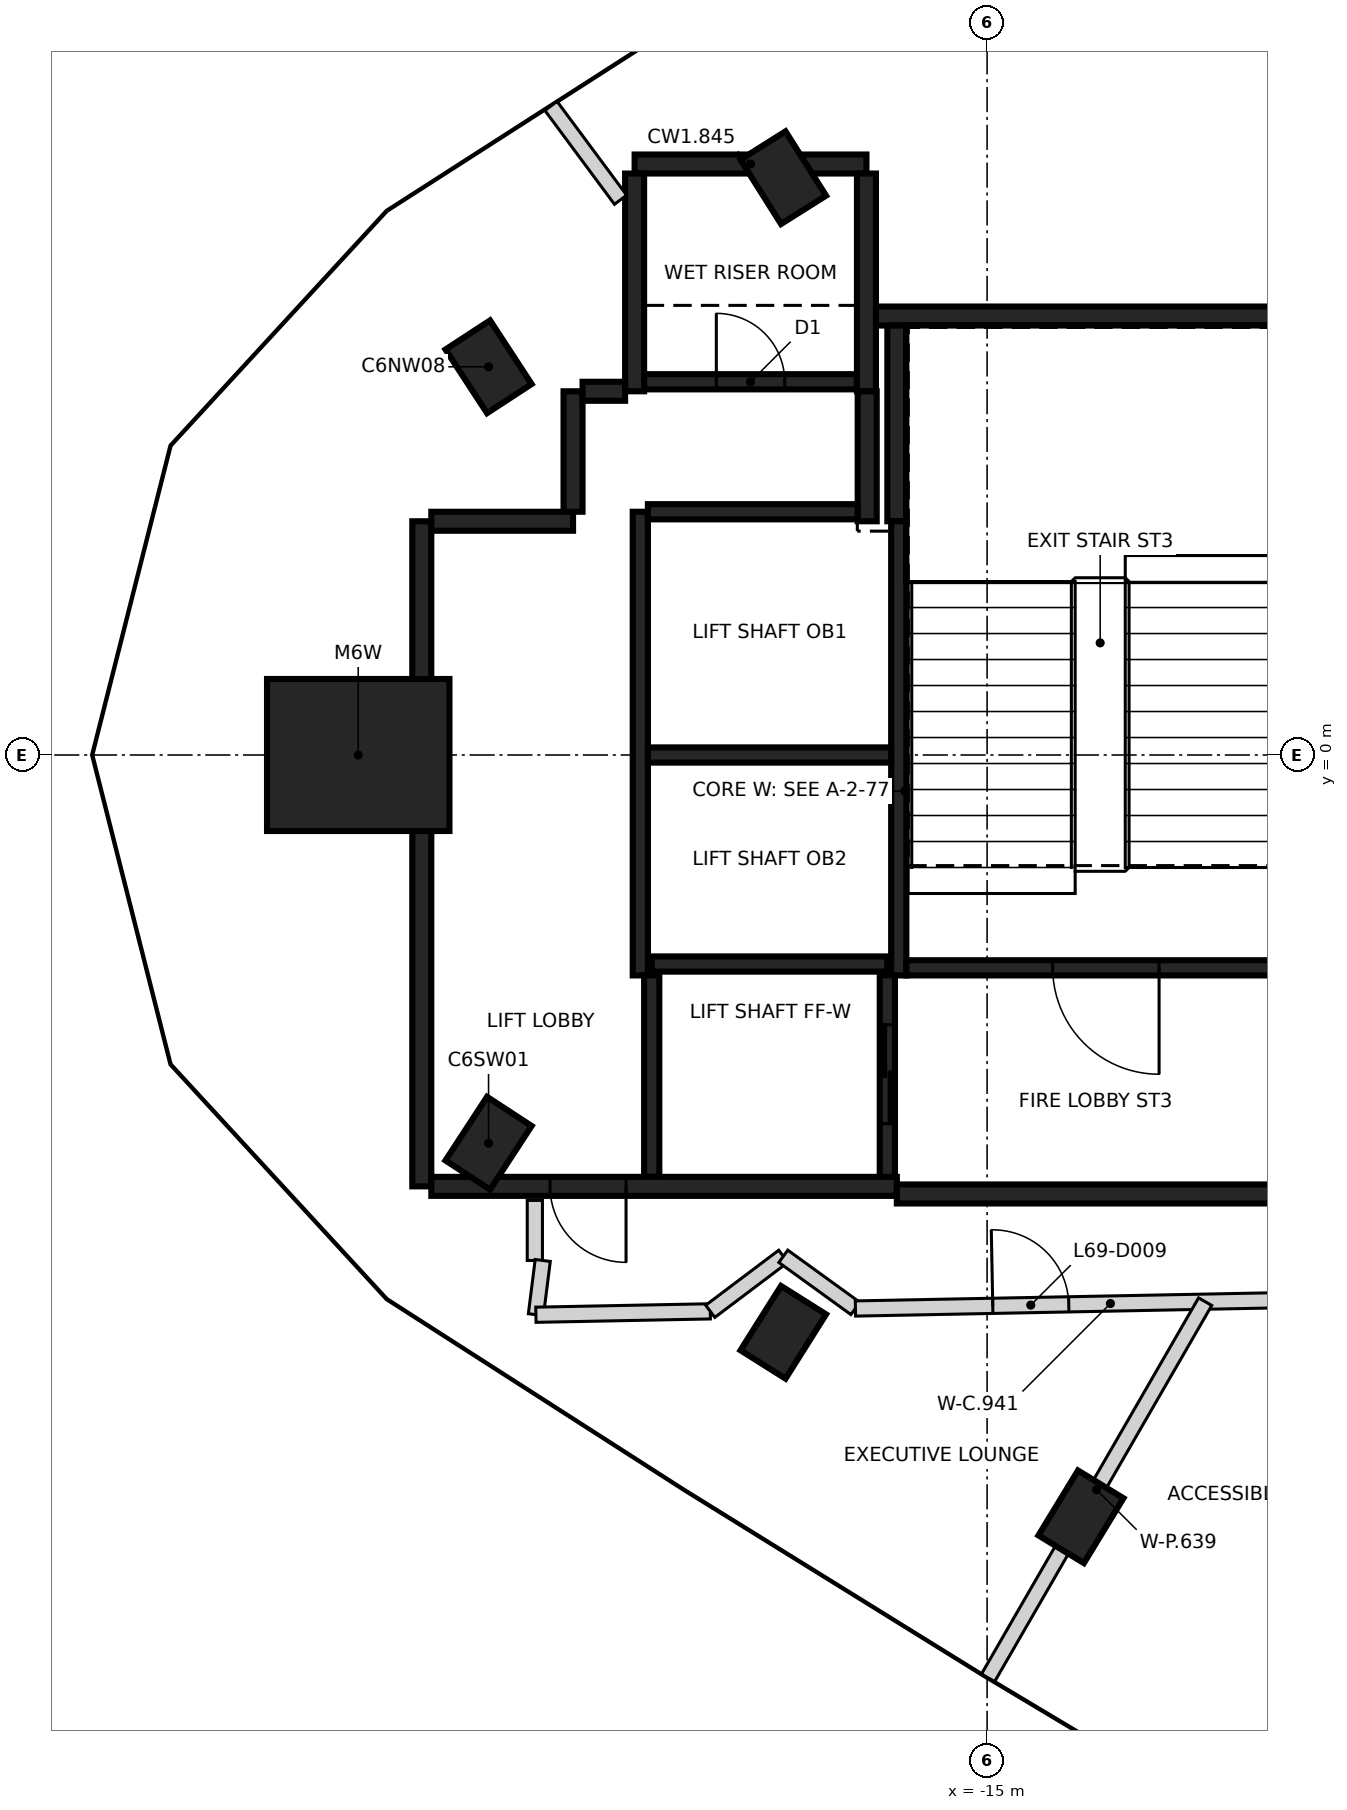
"""IFC4 building model, lengths in metres.
Left out: names, types, materials, properties, quantities, classifications, styles, units other than length and angle.
Written with IfcOpenShell. Run it as: python <this file> out.ifc"""

import sys

from ifc_helpers import new_model, si_unit, direction, frame, frame_2d, origin, origin_2d, place, context, subcontext, project, spatial, rectangle, extrude, element, fill, save


model = new_model("IFC4")
c1 = context("Model", 3, precision=1e-05, world=origin(), true_north=direction((0.0, 1.0)))
c2 = subcontext(c1, "Body", "Model", "MODEL_VIEW")
j1 = project(units=[si_unit("LENGTHUNIT", "METRE"), si_unit("PLANEANGLEUNIT", "RADIAN")], contexts=[c1])
p1 = place(None, origin())
s1 = spatial("IfcSite", under=j1, at=p1, CompositionType="ELEMENT")
p2 = place(p1, origin())
s2 = spatial("IfcBuilding", under=s1, at=p2, CompositionType="ELEMENT")
p3 = place(p2, frame((0.0, 0.0, 273.0)))
s3 = spatial("IfcBuildingStorey", under=s2, at=p3, CompositionType="ELEMENT", Elevation=273.0)
for number, where, z_axis, x_axis in (
    (1, (-17.681, 7.595, -0.35), (0.0, 0.0, 1.0), (-0.533, 0.846, 0.0)),
    (2, (-21.559, 5.107, -0.35), (0.0, 0.0, 1.0), (-0.547, 0.837, 0.0)),
    (3, (-21.559, -5.107, -0.35), (0.0, 0.0, 1.0), (0.547, 0.837, 0.0)),
    (4, (-17.681, -7.595, -0.35), (0.0, 0.0, 1.0), (0.533, 0.846, 0.0)),
    (5, (-13.765, -10.022, -0.35), (0.0, 0.0, 1.0), (0.52, 0.854, 0.0)),
):
    element("IfcColumn", number, at=place(p3, frame(where, z_axis=z_axis, x_axis=x_axis)), inside=s3, PredefinedType="COLUMN", context=c2, shape_type="SweptSolid", body=[
        extrude(rectangle(XDim=1.0, YDim=0.7, at=origin_2d()), origin(), (0.0, 0.0, 1.0), 3.6),
    ])
p4 = place(p3, frame((-23.273, 0.0, -0.35), z_axis=(0.0, 0.0, 1.0), x_axis=(1.0, 0.0, 0.0)))
e6 = element("IfcColumn", 6, at=p4, inside=s3, PredefinedType="COLUMN", context=c2, shape_type="SweptSolid", body=[
    extrude(rectangle(XDim=2.4, YDim=2.0, at=origin_2d()), origin(), (0.0, 0.0, 1.0), 3.6),
])
p5 = place(p3, frame((-22.437, -5.675, 0.0), z_axis=(0.0, 0.0, 1.0), x_axis=(0.0, 1.0, 0.0)))
e7 = element("IfcWall", 7, at=p5, inside=s3, PredefinedType="SHEAR", context=c2, shape_type="SweptSolid", body=[
    extrude(rectangle(XDim=8.75, YDim=0.25, at=frame_2d((4.375, 0.0))), origin(), (0.0, 0.0, 1.0), 3.25),
])
p6 = place(p3, frame((-16.187, -5.675, 0.0), z_axis=(0.0, 0.0, 1.0), x_axis=(-1.0, 0.0, 0.0)))
e8 = element("IfcWall", 8, at=p6, inside=s3, PredefinedType="SHEAR", context=c2, shape_type="SweptSolid", body=[
    extrude(rectangle(XDim=6.125, YDim=0.25, at=frame_2d((3.062, 0.0))), origin(), (0.0, 0.0, 1.0), 3.25),
])
p7 = place(p6, frame((3.563, 0.0, 0.0)))
e9 = element("IfcOpeningElement", 9, at=p7, cuts=e8, PredefinedType="OPENING", context=c2, shape_type="SweptSolid", body=[
    extrude(rectangle(XDim=1.0, YDim=2.1, at=frame_2d((0.5, 1.05))), frame((0.0, 0.135, 0.0), z_axis=(0.0, -1.0, 0.0), x_axis=(1.0, 0.0, 0.0)), (0.0, 0.0, 1.0), 0.27),
])
p8 = place(p3, frame((-10.963, -5.775, 0.0), z_axis=(0.0, 0.0, 1.0), x_axis=(-1.0, 0.0, 0.0)))
e10 = element("IfcWall", 10, at=p8, inside=s3, PredefinedType="SHEAR", context=c2, shape_type="SweptSolid", body=[
    extrude(rectangle(XDim=5.225, YDim=0.25, at=frame_2d((2.612, 0.0))), origin(), (0.0, 0.0, 1.0), 3.25),
])
p9 = place(p3, frame((-16.472, 5.775, 0.0), z_axis=(0.0, 0.0, 1.0), x_axis=(1.0, 0.0, 0.0)))
e11 = element("IfcWall", 11, at=p9, inside=s3, PredefinedType="SHEAR", context=c2, shape_type="SweptSolid", body=[
    extrude(rectangle(XDim=5.51, YDim=0.25, at=frame_2d((2.755, 0.0))), origin(), (0.0, 0.0, 1.0), 3.25),
])
p10 = place(p3, frame((-19.637, 7.775, 0.0), z_axis=(0.0, 0.0, 1.0), x_axis=(1.0, 0.0, 0.0)))
e12 = element("IfcWall", 12, at=p10, inside=s3, PredefinedType="SHEAR", context=c2, shape_type="SweptSolid", body=[
    extrude(rectangle(XDim=3.05, YDim=0.25, at=frame_2d((1.525, 0.0))), origin(), (0.0, 0.0, 1.0), 3.25),
])
for number, where, z_axis, x_axis in (
    (13, (-16.587, 7.65, 0.0), (0.0, 0.0, 1.0), (0.0, -1.0, 0.0)),
    (14, (-19.637, 4.785, 0.0), (0.0, 0.0, 1.0), (0.0, 1.0, 0.0)),
):
    element("IfcWall", number, at=place(p3, frame(where, z_axis=z_axis, x_axis=x_axis)), inside=s3, PredefinedType="SHEAR", context=c2, shape_type="SweptSolid", body=[
        extrude(rectangle(XDim=2.865, YDim=0.25, at=frame_2d((1.432, 0.0))), origin(), (0.0, 0.0, 1.0), 3.25),
    ])
p11 = place(p3, frame((-16.187, 3.075, 0.0), z_axis=(0.0, 0.0, 1.0), x_axis=(0.0, 1.0, 0.0)))
e15 = element("IfcWall", 15, at=p11, inside=s3, PredefinedType="SHEAR", context=c2, shape_type="SweptSolid", body=[
    extrude(rectangle(XDim=2.575, YDim=0.25, at=frame_2d((1.287, 0.0))), origin(), (0.0, 0.0, 1.0), 3.25),
])
p12 = place(p3, frame((-22.312, 3.075, 0.0), z_axis=(0.0, 0.0, 1.0), x_axis=(1.0, 0.0, 0.0)))
e16 = element("IfcWall", 16, at=p12, inside=s3, PredefinedType="SHEAR", context=c2, shape_type="SweptSolid", body=[
    extrude(rectangle(XDim=1.865, YDim=0.25, at=frame_2d((0.932, 0.0))), origin(), (0.0, 0.0, 1.0), 3.25),
])
p13 = place(p3, frame((-16.577, 4.785, 0.0), z_axis=(0.0, 0.0, 1.0), x_axis=(0.0, -1.0, 0.0)))
e17 = element("IfcWall", 17, at=p13, inside=s3, PredefinedType="SHEAR", context=c2, shape_type="SweptSolid", body=[
    extrude(rectangle(XDim=1.71, YDim=0.25, at=frame_2d((0.855, 0.0))), origin(), (0.0, 0.0, 1.0), 3.25),
])
p14 = place(p3, frame((-20.447, 3.2, 0.0), z_axis=(0.0, 0.0, 1.0), x_axis=(0.0, 1.0, 0.0)))
e18 = element("IfcWall", 18, at=p14, inside=s3, PredefinedType="SHEAR", context=c2, shape_type="SweptSolid", body=[
    extrude(rectangle(XDim=1.584, YDim=0.25, at=frame_2d((0.792, 0.0))), origin(), (0.0, 0.0, 1.0), 3.25),
])
p15 = place(p3, frame((-20.322, 4.785, 0.0), z_axis=(0.0, 0.0, 1.0), x_axis=(1.0, 0.0, 0.0)))
e19 = element("IfcWall", 19, at=p15, inside=s3, PredefinedType="SHEAR", context=c2, shape_type="SweptSolid", body=[
    extrude(rectangle(XDim=0.559, YDim=0.25, at=frame_2d((0.28, 0.0))), origin(), (0.0, 0.0, 1.0), 3.25),
])
p16 = place(p3, frame((-16.162, 3.074, 0.0), z_axis=(0.0, 0.0, 1.0), x_axis=(0.0, -1.0, 0.0)))
e20 = element("IfcWall", 20, at=p16, inside=s3, PredefinedType="SHEAR", context=c2, shape_type="SweptSolid", body=[
    extrude(rectangle(XDim=5.974, YDim=0.2, at=frame_2d((2.987, 0.0))), origin(), (0.0, 0.0, 1.0), 3.25),
])
p17 = place(p3, frame((-19.562, -2.9, 0.0), z_axis=(0.0, 0.0, 1.0), x_axis=(0.0, 1.0, 0.0)))
e21 = element("IfcWall", 21, at=p17, inside=s3, PredefinedType="SHEAR", context=c2, shape_type="SweptSolid", body=[
    extrude(rectangle(XDim=6.1, YDim=0.2, at=frame_2d((3.05, 0.0))), origin(), (0.0, 0.0, 1.0), 3.25),
])
p18 = place(p3, frame((-10.963, -2.8, 0.0), z_axis=(0.0, 0.0, 1.0), x_axis=(-1.0, 0.0, 0.0)))
e22 = element("IfcWall", 22, at=p18, inside=s3, PredefinedType="SHEAR", context=c2, shape_type="SweptSolid", body=[
    extrude(rectangle(XDim=5.098, YDim=0.2, at=frame_2d((2.549, 0.0))), origin(), (0.0, 0.0, 1.0), 3.25),
])
p19 = place(p18, frame((1.774, 0.0, 0.0)))
e23 = element("IfcOpeningElement", 23, at=p19, cuts=e22, PredefinedType="OPENING", context=c2, shape_type="SweptSolid", body=[
    extrude(rectangle(XDim=1.4, YDim=2.1, at=frame_2d((0.7, 1.05))), frame((0.0, 0.11, 0.0), z_axis=(0.0, -1.0, 0.0), x_axis=(1.0, 0.0, 0.0)), (0.0, 0.0, 1.0), 0.22),
])
p20 = place(p3, frame((-16.263, 0.0, 0.0), z_axis=(0.0, 0.0, 1.0), x_axis=(-1.0, 0.0, 0.0)))
e24 = element("IfcWall", 24, at=p20, inside=s3, PredefinedType="SHEAR", context=c2, shape_type="SweptSolid", body=[
    extrude(rectangle(XDim=3.198, YDim=0.2, at=frame_2d((1.599, 0.0))), origin(), (0.0, 0.0, 1.0), 3.25),
])
p21 = place(p3, frame((-19.511, 4.91, 0.0), z_axis=(0.0, 0.0, 1.0), x_axis=(1.0, 0.0, 0.0)))
e25 = element("IfcWall", 25, at=p21, inside=s3, PredefinedType="SHEAR", context=c2, shape_type="SweptSolid", body=[
    extrude(rectangle(XDim=2.798, YDim=0.2, at=frame_2d((1.399, 0.0))), origin(), (0.0, 0.0, 1.0), 3.25),
])
p22 = place(p21, frame((0.949, 0.0, 0.0)))
e26 = element("IfcOpeningElement", 26, at=p22, cuts=e25, PredefinedType="OPENING", context=c2, shape_type="SweptSolid", body=[
    extrude(rectangle(XDim=0.9, YDim=2.1, at=frame_2d((0.45, 1.05))), frame((0.0, 0.11, 0.0), z_axis=(0.0, -1.0, 0.0), x_axis=(1.0, 0.0, 0.0)), (0.0, 0.0, 1.0), 0.22),
])
p23 = place(p3, frame((-19.462, 3.2, 0.0), z_axis=(0.0, 0.0, 1.0), x_axis=(1.0, 0.0, 0.0)))
e27 = element("IfcWall", 27, at=p23, inside=s3, PredefinedType="SHEAR", context=c2, shape_type="SweptSolid", body=[
    extrude(rectangle(XDim=2.759, YDim=0.2, at=frame_2d((1.379, 0.0))), origin(), (0.0, 0.0, 1.0), 3.25),
])
p24 = place(p3, frame((-19.412, -2.75, 0.0), z_axis=(0.0, 0.0, 1.0), x_axis=(1.0, 0.0, 0.0)))
e28 = element("IfcWall", 28, at=p24, inside=s3, PredefinedType="SHEAR", context=c2, shape_type="SweptSolid", body=[
    extrude(rectangle(XDim=3.1, YDim=0.2, at=frame_2d((1.55, 0.0))), origin(), (0.0, 0.0, 1.0), 3.25),
])
p25 = place(p3, frame((-16.312, -2.898, 0.0), z_axis=(0.0, 0.0, 1.0), x_axis=(0.0, -1.0, 0.0)))
e29 = element("IfcWall", 29, at=p25, inside=s3, PredefinedType="SHEAR", context=c2, shape_type="SweptSolid", body=[
    extrude(rectangle(XDim=2.651, YDim=0.2, at=frame_2d((1.325, 0.0))), origin(), (0.0, 0.0, 1.0), 3.25),
])
p26 = place(p25, frame((0.652, 0.0, 0.0)))
e30 = element("IfcOpeningElement", 30, at=p26, cuts=e29, PredefinedType="OPENING", context=c2, shape_type="SweptSolid", body=[
    extrude(rectangle(XDim=1.3, YDim=2.1, at=frame_2d((0.65, 1.05))), frame((0.0, 0.11, 0.0), z_axis=(0.0, -1.0, 0.0), x_axis=(1.0, 0.0, 0.0)), (0.0, 0.0, 1.0), 0.22),
])
p27 = place(p3, frame((-19.412, -5.549, 0.0), z_axis=(0.0, 0.0, 1.0), x_axis=(0.0, 1.0, 0.0)))
e31 = element("IfcWall", 31, at=p27, inside=s3, PredefinedType="SHEAR", context=c2, shape_type="SweptSolid", body=[
    extrude(rectangle(XDim=2.651, YDim=0.2, at=frame_2d((1.325, 0.0))), origin(), (0.0, 0.0, 1.0), 3.25),
])
p28 = place(p3, frame((-20.95, -6.65, 0.0), z_axis=(0.0, 0.0, 1.0), x_axis=(0.0, 1.0, 0.0)))
e32 = element("IfcWall", 32, at=p28, inside=s3, PredefinedType="PARTITIONING", context=c2, shape_type="SweptSolid", body=[
    extrude(rectangle(XDim=0.79, YDim=0.2, at=frame_2d((0.395, 0.0))), origin(), (0.0, 0.0, 1.0), 3.25),
])
p29 = place(p3, frame((-20.936, -7.363, 0.0), z_axis=(0.0, 0.0, 1.0), x_axis=(0.125330520795, 0.992115044013, 0.0)))
e33 = element("IfcWall", 33, at=p29, inside=s3, PredefinedType="PARTITIONING", context=c2, shape_type="SweptSolid", body=[
    extrude(rectangle(XDim=0.719, YDim=0.2, at=frame_2d((0.359, 0.0))), origin(), (0.0, 0.0, 1.0), 3.25),
])
p30 = place(p3, frame((-20.936, -7.364, 0.0), z_axis=(0.0, 0.0, 1.0), x_axis=(0.999810389391, 0.019472679998, 0.0)))
e34 = element("IfcWall", 34, at=p30, inside=s3, PredefinedType="PARTITIONING", context=c2, shape_type="SweptSolid", body=[
    extrude(rectangle(XDim=2.294, YDim=0.2, at=frame_2d((1.147, 0.0))), origin(), (0.0, 0.0, 1.0), 3.25),
])
p31 = place(p3, frame((-18.642, -7.319, 0.0), z_axis=(0.0, 0.0, 1.0), x_axis=(0.798707882989, 0.601718968998, 0.0)))
e35 = element("IfcWall", 35, at=p31, inside=s3, PredefinedType="PARTITIONING", context=c2, shape_type="SweptSolid", body=[
    extrude(rectangle(XDim=1.203, YDim=0.2, at=frame_2d((0.602, 0.0))), origin(), (0.0, 0.0, 1.0), 2.35),
])
p32 = place(p3, frame((-17.681, -6.595, 0.0), z_axis=(0.0, 0.0, 1.0), x_axis=(0.810123213102, -0.586259652026, 0.0)))
e36 = element("IfcWall", 36, at=p32, inside=s3, PredefinedType="PARTITIONING", context=c2, shape_type="SweptSolid", body=[
    extrude(rectangle(XDim=1.17, YDim=0.2, at=frame_2d((0.585, 0.0))), origin(), (0.0, 0.0, 1.0), 3.25),
])
p33 = place(p3, frame((-16.732, -7.282, 0.0), z_axis=(0.0, 0.0, 1.0), x_axis=(0.999809829903, 0.019501385329, 0.0)))
e37 = element("IfcWall", 37, at=p33, inside=s3, PredefinedType="PARTITIONING", context=c2, shape_type="SweptSolid", body=[
    extrude(rectangle(XDim=6.71, YDim=0.2, at=frame_2d((3.355, 0.0))), origin(), (0.0, 0.0, 1.0), 3.25),
])
p34 = place(p33, frame((1.807, 0.0, 0.0)))
e38 = element("IfcOpeningElement", 38, at=p34, cuts=e37, PredefinedType="OPENING", context=c2, shape_type="SweptSolid", body=[
    extrude(rectangle(XDim=1.0, YDim=2.1, at=frame_2d((0.5, 1.05))), frame((0.0, 0.11, 0.0), z_axis=(0.0, -1.0, 0.0), x_axis=(1.0, 0.0, 0.0)), (0.0, 0.0, 1.0), 0.22),
])
p35 = place(p33, frame((5.51, 0.0, 0.0)))
e39 = element("IfcOpeningElement", 39, at=p35, cuts=e37, PredefinedType="OPENING", context=c2, shape_type="SweptSolid", body=[
    extrude(rectangle(XDim=1.0, YDim=2.1, at=frame_2d((0.5, 1.05))), frame((0.0, 0.11, 0.0), z_axis=(0.0, -1.0, 0.0), x_axis=(1.0, 0.0, 0.0)), (0.0, 0.0, 1.0), 0.22),
])
p36 = place(p3, frame((-20.738, 8.539, 0.0), z_axis=(0.0, 0.0, 1.0), x_axis=(0.595694844153, -0.803210839475, 0.0)))
e40 = element("IfcWall", 40, at=p36, inside=s3, PredefinedType="PARTITIONING", context=c2, shape_type="SweptSolid", body=[
    extrude(rectangle(XDim=1.536, YDim=0.2, at=frame_2d((0.768, 0.0))), origin(), (0.0, 0.0, 1.0), 3.25),
])
p37 = place(p3, frame((-14.987, -12.14, 0.0), z_axis=(0.0, 0.0, 1.0), x_axis=(0.499912336857, 0.866076010208, 0.0)))
e41 = element("IfcWall", 41, at=p37, inside=s3, PredefinedType="PARTITIONING", context=c2, shape_type="SweptSolid", body=[
    extrude(rectangle(XDim=5.713, YDim=0.2, at=frame_2d((2.857, 0.0))), origin(), (0.0, 0.0, 1.0), 3.25),
])
p38 = place(p26, origin())
e42 = element("IfcDoor", 42, at=p38, inside=s3, OperationType="SLIDING_TO_RIGHT", PredefinedType="DOOR", context=c2, shape_type="SweptSolid", body=[
    extrude(rectangle(XDim=1.3, YDim=2.1, at=frame_2d((0.65, 1.05))), frame((0.0, 0.025, 0.0), z_axis=(0.0, -1.0, 0.0), x_axis=(1.0, 0.0, 0.0)), (0.0, 0.0, 1.0), 0.05),
])
fill(e30, e42)
p39 = place(p7, origin())
e43 = element("IfcDoor", 43, at=p39, inside=s3, OperationType="SINGLE_SWING_LEFT", PredefinedType="DOOR", context=c2, shape_type="SweptSolid", body=[
    extrude(rectangle(XDim=1.0, YDim=2.1, at=frame_2d((0.5, 1.05))), frame((0.0, 0.025, 0.0), z_axis=(0.0, -1.0, 0.0), x_axis=(1.0, 0.0, 0.0)), (0.0, 0.0, 1.0), 0.05),
])
fill(e9, e43)
p40 = place(p19, origin())
e44 = element("IfcDoor", 44, at=p40, inside=s3, OperationType="SINGLE_SWING_RIGHT", PredefinedType="DOOR", context=c2, shape_type="SweptSolid", body=[
    extrude(rectangle(XDim=1.4, YDim=2.1, at=frame_2d((0.7, 1.05))), frame((0.0, 0.025, 0.0), z_axis=(0.0, -1.0, 0.0), x_axis=(1.0, 0.0, 0.0)), (0.0, 0.0, 1.0), 0.05),
])
fill(e23, e44)
p41 = place(p22, origin())
e45 = element("IfcDoor", 45, at=p41, inside=s3, OperationType="SINGLE_SWING_LEFT", PredefinedType="DOOR", context=c2, shape_type="SweptSolid", body=[
    extrude(rectangle(XDim=0.9, YDim=2.1, at=frame_2d((0.45, 1.05))), frame((0.0, 0.025, 0.0), z_axis=(0.0, -1.0, 0.0), x_axis=(1.0, 0.0, 0.0)), (0.0, 0.0, 1.0), 0.05),
])
fill(e26, e45)
p42 = place(p34, origin())
e46 = element("IfcDoor", 46, at=p42, inside=s3, OperationType="SINGLE_SWING_LEFT", PredefinedType="DOOR", context=c2, shape_type="SweptSolid", body=[
    extrude(rectangle(XDim=1.0, YDim=2.1, at=frame_2d((0.5, 1.05))), frame((0.0, 0.025, 0.0), z_axis=(0.0, -1.0, 0.0), x_axis=(1.0, 0.0, 0.0)), (0.0, 0.0, 1.0), 0.05),
])
fill(e38, e46)
save(model, sys.argv[1])
